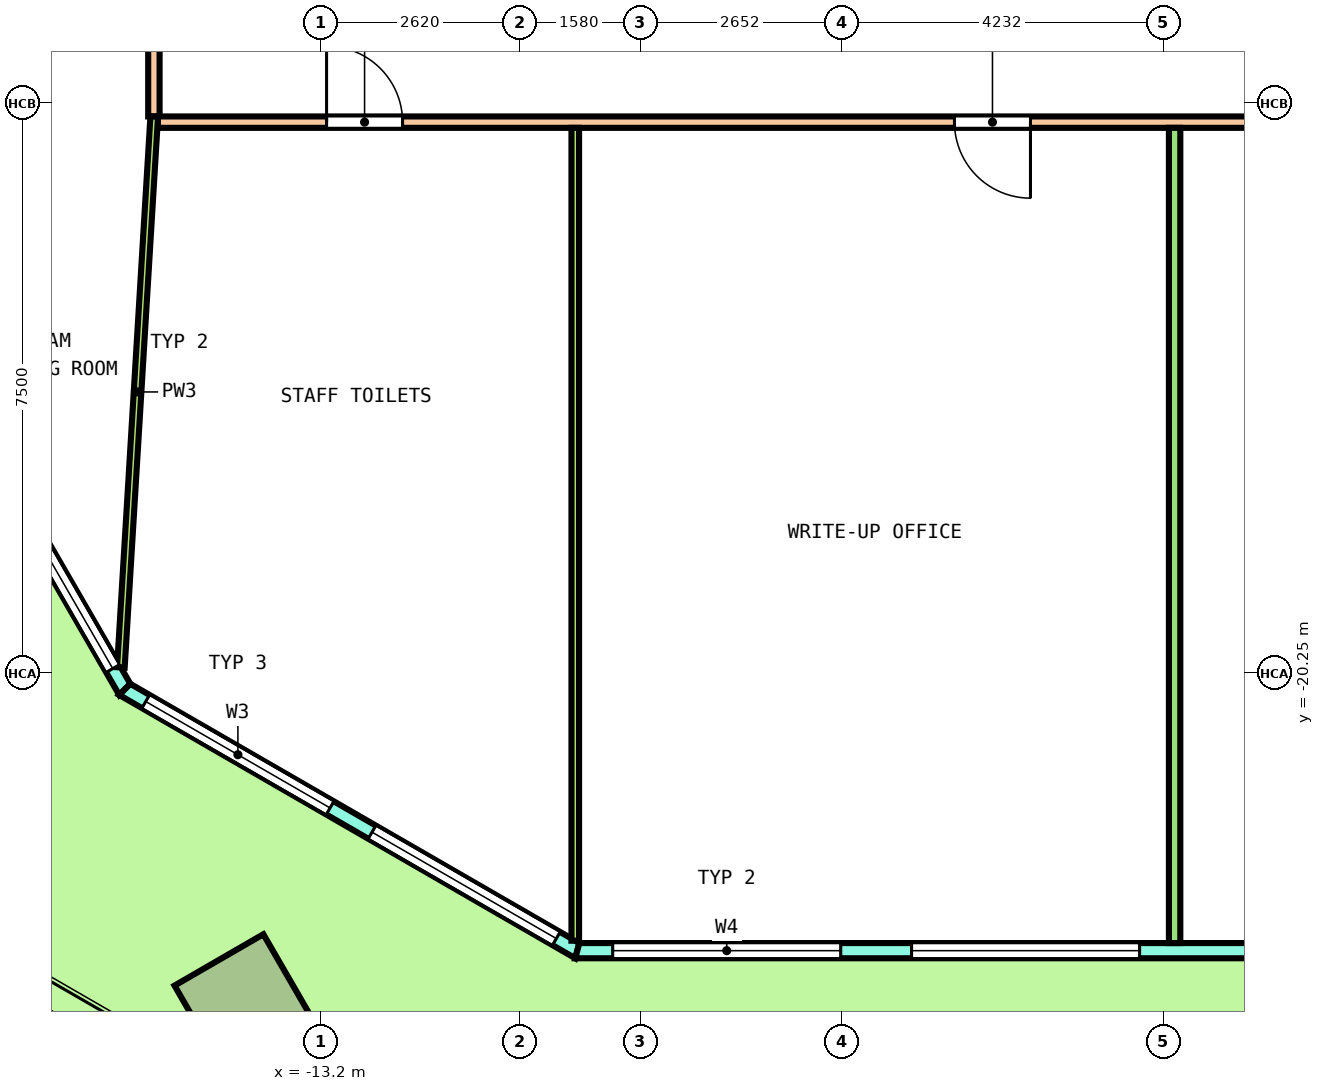
"""IFC4 building model, lengths in metres.
Left out: names, types, materials, properties, quantities, classifications, styles, units other than length and angle.
Written with IfcOpenShell. Run it as: python <this file> out.ifc"""

import sys

from ifc_helpers import new_model, si_unit, direction, frame, frame_2d, origin, origin_2d, place, context, subcontext, project, spatial, polyline, rectangle, outline, extrude, element, fill, save


model = new_model("IFC4")
c1 = context("Model", 3, precision=1e-05, world=origin(), true_north=direction((0.0, 1.0)))
c2 = subcontext(c1, "Body", "Model", "MODEL_VIEW")
j1 = project(units=[si_unit("LENGTHUNIT", "METRE"), si_unit("PLANEANGLEUNIT", "RADIAN")], contexts=[c1])
p1 = place(None, origin())
s1 = spatial("IfcSite", under=j1, at=p1, CompositionType="ELEMENT")
p2 = place(p1, origin())
s2 = spatial("IfcBuilding", under=s1, at=p2, CompositionType="ELEMENT")
p3 = place(p2, frame((0.0, 0.0, 80.8)))
s3 = spatial("IfcBuildingStorey", under=s2, at=p3, CompositionType="ELEMENT", Elevation=80.8)
p4 = place(p3, frame((-14.206, -24.606, 0.0), z_axis=(0.018132630042, -0.031385715123, 0.999342856388), x_axis=(0.866156195426, -0.498787200508, -0.031381104725)))
e1 = element("IfcColumn", 1, at=p4, inside=s3, PredefinedType="COLUMN", context=c2, shape_type="SweptSolid", body=[
    extrude(rectangle(XDim=1.35, YDim=1.35, at=origin_2d()), origin(), (0.0, 0.0, 1.0), 4.053),
])
p5 = place(p3, frame((-25.613, -3.437, 0.0), z_axis=(0.0, 0.0, 1.0), x_axis=(0.499999083763, -0.866025932773, 0.0)))
e2 = element("IfcWall", 2, at=p5, inside=s3, PredefinedType="SOLIDWALL", context=c2, shape_type="SweptSolid", body=[
    extrude(outline(polyline([(-0.027, -0.1), (1.011, -0.1), (2.048, -0.1), (3.086, -0.1), (4.123, -0.1), (5.161, -0.1), (6.198, -0.1), (7.236, -0.1), (8.273, -0.1), (9.311, -0.1), (10.348, -0.1), (11.386, -0.1), (12.423, -0.1), (13.461, -0.1), (14.499, -0.1), (15.536, -0.1), (16.573, -0.1), (17.611, -0.1), (18.648, -0.1), (19.686, -0.1), (19.632, 0.1), (18.6, 0.1), (17.569, 0.1), (16.537, 0.1), (15.505, 0.1), (14.473, 0.1), (13.441, 0.1), (12.409, 0.1), (11.377, 0.1), (10.345, 0.1), (9.314, 0.1), (8.282, 0.1), (7.25, 0.1), (6.218, 0.1), (5.186, 0.1), (4.154, 0.1), (3.123, 0.1), (2.091, 0.1), (1.059, 0.1), (0.027, 0.1), (-0.027, -0.1)])), origin(), (0.0, 0.0, 1.0), 4.1),
])
p6 = place(p5, frame((0.316, 0.0, 0.1)))
e3 = element("IfcOpeningElement", 3, at=p6, cuts=e2, PredefinedType="OPENING", context=c2, shape_type="SweptSolid", body=[
    extrude(rectangle(XDim=3.3, YDim=2.9, at=frame_2d((1.65, 1.45))), frame((0.0, 0.11, 0.0), z_axis=(0.0, -1.0, 0.0), x_axis=(1.0, 0.0, 0.0)), (0.0, 0.0, 1.0), 0.22),
])
p7 = place(p5, frame((4.248, 0.0, 0.1)))
e4 = element("IfcOpeningElement", 4, at=p7, cuts=e2, PredefinedType="OPENING", context=c2, shape_type="SweptSolid", body=[
    extrude(rectangle(XDim=3.3, YDim=2.9, at=frame_2d((1.65, 1.45))), frame((0.0, 0.11, 0.0), z_axis=(0.0, -1.0, 0.0), x_axis=(1.0, 0.0, 0.0)), (0.0, 0.0, 1.0), 0.22),
])
p8 = place(p5, frame((8.93, 0.0, 0.0)))
e5 = element("IfcOpeningElement", 5, at=p8, cuts=e2, PredefinedType="OPENING", context=c2, shape_type="SweptSolid", body=[
    extrude(rectangle(XDim=1.8, YDim=2.4, at=frame_2d((0.9, 1.2))), frame((0.0, 0.11, 0.0), z_axis=(0.0, -1.0, 0.0), x_axis=(1.0, 0.0, 0.0)), (0.0, 0.0, 1.0), 0.22),
])
p9 = place(p5, frame((8.93, 0.0, 2.55)))
e6 = element("IfcOpeningElement", 6, at=p9, cuts=e2, PredefinedType="OPENING", context=c2, shape_type="SweptSolid", body=[
    extrude(rectangle(XDim=1.8, YDim=0.45, at=frame_2d((0.9, 0.225))), frame((0.0, 0.11, 0.0), z_axis=(0.0, -1.0, 0.0), x_axis=(1.0, 0.0, 0.0)), (0.0, 0.0, 1.0), 0.22),
])
p10 = place(p5, frame((12.112, 0.0, 0.1)))
e7 = element("IfcOpeningElement", 7, at=p10, cuts=e2, PredefinedType="OPENING", context=c2, shape_type="SweptSolid", body=[
    extrude(rectangle(XDim=3.3, YDim=2.9, at=frame_2d((1.65, 1.45))), frame((0.0, 0.11, 0.0), z_axis=(0.0, -1.0, 0.0), x_axis=(1.0, 0.0, 0.0)), (0.0, 0.0, 1.0), 0.22),
])
p11 = place(p5, frame((16.043, 0.0, 0.1)))
e8 = element("IfcOpeningElement", 8, at=p11, cuts=e2, PredefinedType="OPENING", context=c2, shape_type="SweptSolid", body=[
    extrude(rectangle(XDim=3.3, YDim=2.9, at=frame_2d((1.65, 1.45))), frame((0.0, 0.11, 0.0), z_axis=(0.0, -1.0, 0.0), x_axis=(1.0, 0.0, 0.0)), (0.0, 0.0, 1.0), 0.22),
])
p12 = place(p3, frame((-15.783, -20.463, 0.0), z_axis=(0.0, 0.0, 1.0), x_axis=(0.866029458321, -0.49999297727, 0.0)))
e9 = element("IfcWall", 9, at=p12, inside=s3, PredefinedType="SOLIDWALL", context=c2, shape_type="SweptSolid", body=[
    extrude(outline(polyline([(-0.027, -0.1), (1.128, -0.1), (2.282, -0.1), (3.437, -0.1), (4.592, -0.1), (5.747, -0.1), (6.901, -0.1), (6.848, 0.1), (5.711, 0.1), (4.574, 0.1), (3.437, 0.1), (2.301, 0.1), (1.164, 0.1), (0.027, 0.1), (-0.027, -0.1)])), origin(), (0.0, 0.0, 1.0), 4.1),
])
p13 = place(p12, frame((0.319, 0.0, 0.1)))
e10 = element("IfcOpeningElement", 10, at=p13, cuts=e9, PredefinedType="OPENING", context=c2, shape_type="SweptSolid", body=[
    extrude(rectangle(XDim=2.8, YDim=2.9, at=frame_2d((1.4, 1.45))), frame((0.0, 0.11, 0.0), z_axis=(0.0, -1.0, 0.0), x_axis=(1.0, 0.0, 0.0)), (0.0, 0.0, 1.0), 0.22),
])
p14 = place(p12, frame((3.756, 0.0, 0.1)))
e11 = element("IfcOpeningElement", 11, at=p14, cuts=e9, PredefinedType="OPENING", context=c2, shape_type="SweptSolid", body=[
    extrude(rectangle(XDim=2.8, YDim=2.9, at=frame_2d((1.4, 1.45))), frame((0.0, 0.11, 0.0), z_axis=(0.0, -1.0, 0.0), x_axis=(1.0, 0.0, 0.0)), (0.0, 0.0, 1.0), 0.22),
])
p15 = place(p3, frame((-9.83, -23.9, 0.0), z_axis=(0.0, 0.0, 1.0), x_axis=(1.0, 0.0, 0.0)))
e12 = element("IfcWall", 12, at=p15, inside=s3, PredefinedType="SOLIDWALL", context=c2, shape_type="SweptSolid", body=[
    extrude(outline(polyline([(-0.027, -0.1), (1.011, -0.1), (2.048, -0.1), (3.086, -0.1), (4.123, -0.1), (5.161, -0.1), (6.198, -0.1), (7.236, -0.1), (8.273, -0.1), (9.311, -0.1), (10.348, -0.1), (11.386, -0.1), (12.423, -0.1), (13.461, -0.1), (14.499, -0.1), (15.536, -0.1), (16.573, -0.1), (17.611, -0.1), (18.648, -0.1), (19.686, -0.1), (19.632, 0.1), (18.6, 0.1), (17.569, 0.1), (16.537, 0.1), (15.505, 0.1), (14.473, 0.1), (13.441, 0.1), (12.409, 0.1), (11.377, 0.1), (10.345, 0.1), (9.314, 0.1), (8.282, 0.1), (7.25, 0.1), (6.218, 0.1), (5.186, 0.1), (4.154, 0.1), (3.123, 0.1), (2.091, 0.1), (1.059, 0.1), (0.027, 0.1), (-0.027, -0.1)])), origin(), (0.0, 0.0, 1.0), 4.1),
])
p16 = place(p15, frame((0.466, 0.0, 0.1)))
e13 = element("IfcOpeningElement", 13, at=p16, cuts=e12, PredefinedType="OPENING", context=c2, shape_type="SweptSolid", body=[
    extrude(rectangle(XDim=3.0, YDim=2.9, at=frame_2d((1.5, 1.45))), frame((0.0, 0.11, 0.0), z_axis=(0.0, -1.0, 0.0), x_axis=(1.0, 0.0, 0.0)), (0.0, 0.0, 1.0), 0.22),
])
p17 = place(p15, frame((4.398, 0.0, 0.1)))
e14 = element("IfcOpeningElement", 14, at=p17, cuts=e12, PredefinedType="OPENING", context=c2, shape_type="SweptSolid", body=[
    extrude(rectangle(XDim=3.0, YDim=2.9, at=frame_2d((1.5, 1.45))), frame((0.0, 0.11, 0.0), z_axis=(0.0, -1.0, 0.0), x_axis=(1.0, 0.0, 0.0)), (0.0, 0.0, 1.0), 0.22),
])
p18 = place(p15, frame((8.93, 0.0, 0.0)))
e15 = element("IfcOpeningElement", 15, at=p18, cuts=e12, PredefinedType="OPENING", context=c2, shape_type="SweptSolid", body=[
    extrude(rectangle(XDim=1.8, YDim=2.4, at=frame_2d((0.9, 1.2))), frame((0.0, 0.11, 0.0), z_axis=(0.0, -1.0, 0.0), x_axis=(1.0, 0.0, 0.0)), (0.0, 0.0, 1.0), 0.22),
])
p19 = place(p15, frame((8.93, 0.0, 2.55)))
e16 = element("IfcOpeningElement", 16, at=p19, cuts=e12, PredefinedType="OPENING", context=c2, shape_type="SweptSolid", body=[
    extrude(rectangle(XDim=1.8, YDim=0.45, at=frame_2d((0.9, 0.225))), frame((0.0, 0.11, 0.0), z_axis=(0.0, -1.0, 0.0), x_axis=(1.0, 0.0, 0.0)), (0.0, 0.0, 1.0), 0.22),
])
p20 = place(p15, frame((12.261, 0.0, 0.1)))
e17 = element("IfcOpeningElement", 17, at=p20, cuts=e12, PredefinedType="OPENING", context=c2, shape_type="SweptSolid", body=[
    extrude(rectangle(XDim=3.0, YDim=2.9, at=frame_2d((1.5, 1.45))), frame((0.0, 0.11, 0.0), z_axis=(0.0, -1.0, 0.0), x_axis=(1.0, 0.0, 0.0)), (0.0, 0.0, 1.0), 0.22),
])
p21 = place(p15, frame((16.193, 0.0, 0.1)))
e18 = element("IfcOpeningElement", 18, at=p21, cuts=e12, PredefinedType="OPENING", context=c2, shape_type="SweptSolid", body=[
    extrude(rectangle(XDim=3.0, YDim=2.9, at=frame_2d((1.5, 1.45))), frame((0.0, 0.11, 0.0), z_axis=(0.0, -1.0, 0.0), x_axis=(1.0, 0.0, 0.0)), (0.0, 0.0, 1.0), 0.22),
])
p22 = place(p3, frame((-15.4, -12.925, 0.0), z_axis=(0.0, 0.0, 1.0), x_axis=(0.0, 1.0, 0.0)))
e19 = element("IfcWall", 19, at=p22, inside=s3, PredefinedType="PARTITIONING", context=c2, shape_type="SweptSolid", body=[
    extrude(rectangle(XDim=25.85, YDim=0.15, at=frame_2d((12.925, 0.0))), origin(), (0.0, 0.0, 1.0), 3.05),
])
p23 = place(p22, frame((21.209, 0.0, 0.0)))
e20 = element("IfcOpeningElement", 20, at=p23, cuts=e19, PredefinedType="OPENING", context=c2, shape_type="SweptSolid", body=[
    extrude(rectangle(XDim=1.2, YDim=2.1, at=frame_2d((0.6, 1.05))), frame((0.0, 0.085, 0.0), z_axis=(0.0, -1.0, 0.0), x_axis=(1.0, 0.0, 0.0)), (0.0, 0.0, 1.0), 0.17),
])
p24 = place(p22, frame((15.289, 0.0, 0.0)))
e21 = element("IfcOpeningElement", 21, at=p24, cuts=e19, PredefinedType="OPENING", context=c2, shape_type="SweptSolid", body=[
    extrude(rectangle(XDim=1.2, YDim=2.1, at=frame_2d((0.6, 1.05))), frame((0.0, 0.085, 0.0), z_axis=(0.0, -1.0, 0.0), x_axis=(1.0, 0.0, 0.0)), (0.0, 0.0, 1.0), 0.17),
])
p25 = place(p22, frame((3.441, 0.0, 0.0)))
e22 = element("IfcOpeningElement", 22, at=p25, cuts=e19, PredefinedType="OPENING", context=c2, shape_type="SweptSolid", body=[
    extrude(rectangle(XDim=1.2, YDim=2.1, at=frame_2d((0.6, 1.05))), frame((0.0, 0.085, 0.0), z_axis=(0.0, -1.0, 0.0), x_axis=(1.0, 0.0, 0.0)), (0.0, 0.0, 1.0), 0.17),
])
p26 = place(p3, frame((-15.35, -13.0, 0.0), z_axis=(0.0, 0.0, 1.0), x_axis=(1.0, 0.0, 0.0)))
e23 = element("IfcWall", 23, at=p26, inside=s3, PredefinedType="PARTITIONING", context=c2, shape_type="SweptSolid", body=[
    extrude(rectangle(XDim=30.7, YDim=0.15, at=frame_2d((15.35, 0.0))), origin(), (0.0, 0.0, 1.0), 3.05),
])
p27 = place(p26, frame((2.222, 0.0, 0.0)))
e24 = element("IfcOpeningElement", 24, at=p27, cuts=e23, PredefinedType="OPENING", context=c2, shape_type="SweptSolid", body=[
    extrude(rectangle(XDim=1.0, YDim=2.1, at=frame_2d((0.5, 1.05))), frame((0.0, 0.085, 0.0), z_axis=(0.0, -1.0, 0.0), x_axis=(1.0, 0.0, 0.0)), (0.0, 0.0, 1.0), 0.17),
])
p28 = place(p26, frame((10.482, 0.0, 0.0)))
e25 = element("IfcOpeningElement", 25, at=p28, cuts=e23, PredefinedType="OPENING", context=c2, shape_type="SweptSolid", body=[
    extrude(rectangle(XDim=1.0, YDim=2.1, at=frame_2d((0.5, 1.05))), frame((0.0, 0.085, 0.0), z_axis=(0.0, -1.0, 0.0), x_axis=(1.0, 0.0, 0.0)), (0.0, 0.0, 1.0), 0.17),
])
p29 = place(p26, frame((15.225, 0.0, 0.0)))
e26 = element("IfcOpeningElement", 26, at=p29, cuts=e23, PredefinedType="OPENING", context=c2, shape_type="SweptSolid", body=[
    extrude(rectangle(XDim=1.2, YDim=2.1, at=frame_2d((0.6, 1.05))), frame((0.0, 0.085, 0.0), z_axis=(0.0, -1.0, 0.0), x_axis=(1.0, 0.0, 0.0)), (0.0, 0.0, 1.0), 0.17),
])
p30 = place(p26, frame((22.875, 0.0, 0.0)))
e27 = element("IfcOpeningElement", 27, at=p30, cuts=e23, PredefinedType="OPENING", context=c2, shape_type="SweptSolid", body=[
    extrude(rectangle(XDim=1.2, YDim=2.1, at=frame_2d((0.6, 1.05))), frame((0.0, 0.085, 0.0), z_axis=(0.0, -1.0, 0.0), x_axis=(1.0, 0.0, 0.0)), (0.0, 0.0, 1.0), 0.17),
])
p31 = place(p26, frame((28.852, 0.0, 0.0)))
e28 = element("IfcOpeningElement", 28, at=p31, cuts=e23, PredefinedType="OPENING", context=c2, shape_type="SweptSolid", body=[
    extrude(rectangle(XDim=1.0, YDim=2.1, at=frame_2d((0.5, 1.05))), frame((0.0, 0.085, 0.0), z_axis=(0.0, -1.0, 0.0), x_axis=(1.0, 0.0, 0.0)), (0.0, 0.0, 1.0), 0.17),
])
p32 = place(p3, frame((-1.971, -23.8, 0.0), z_axis=(0.0, 0.0, 1.0), x_axis=(0.0, 1.0, 0.0)))
e29 = element("IfcWall", 29, at=p32, inside=s3, PredefinedType="PARTITIONING", context=c2, shape_type="SweptSolid", body=[
    extrude(rectangle(XDim=10.725, YDim=0.15, at=frame_2d((5.363, 0.0))), origin(), (0.0, 0.0, 1.0), 3.05),
])
p33 = place(p3, frame((-15.834, -20.174, 0.0), z_axis=(0.0, 0.0, 1.0), x_axis=(0.060446339426, 0.998171448224, 0.0)))
e30 = element("IfcWall", 30, at=p33, inside=s3, PredefinedType="PARTITIONING", context=c2, shape_type="SweptSolid", body=[
    extrude(rectangle(XDim=7.262, YDim=0.1, at=frame_2d((3.631, 0.0))), origin(), (0.0, 0.0, 1.0), 3.05),
])
p34 = place(p3, frame((-9.856, -23.769, 0.0), z_axis=(0.0, 0.0, 1.0), x_axis=(0.0, 1.0, 0.0)))
e31 = element("IfcWall", 31, at=p34, inside=s3, PredefinedType="PARTITIONING", context=c2, shape_type="SweptSolid", body=[
    extrude(rectangle(XDim=10.694, YDim=0.1, at=frame_2d((5.347, 0.0))), origin(), (0.0, 0.0, 1.0), 3.05),
])
p35 = place(p11, origin())
e32 = element("IfcWindow", 32, at=p35, inside=s3, PartitioningType="SINGLE_PANEL", PredefinedType="WINDOW", context=c2, shape_type="SweptSolid", body=[
    extrude(rectangle(XDim=3.3, YDim=2.9, at=frame_2d((1.65, 1.45))), frame((0.0, 0.03, 0.0), z_axis=(0.0, -1.0, 0.0), x_axis=(1.0, 0.0, 0.0)), (0.0, 0.0, 1.0), 0.06),
])
fill(e8, e32)
p36 = place(p13, origin())
e33 = element("IfcWindow", 33, at=p36, inside=s3, PartitioningType="SINGLE_PANEL", PredefinedType="WINDOW", context=c2, shape_type="SweptSolid", body=[
    extrude(rectangle(XDim=2.8, YDim=2.9, at=frame_2d((1.4, 1.45))), frame((0.0, 0.03, 0.0), z_axis=(0.0, -1.0, 0.0), x_axis=(1.0, 0.0, 0.0)), (0.0, 0.0, 1.0), 0.06),
])
fill(e10, e33)
p37 = place(p14, origin())
e34 = element("IfcWindow", 34, at=p37, inside=s3, PartitioningType="SINGLE_PANEL", PredefinedType="WINDOW", context=c2, shape_type="SweptSolid", body=[
    extrude(rectangle(XDim=2.8, YDim=2.9, at=frame_2d((1.4, 1.45))), frame((0.0, 0.03, 0.0), z_axis=(0.0, -1.0, 0.0), x_axis=(1.0, 0.0, 0.0)), (0.0, 0.0, 1.0), 0.06),
])
fill(e11, e34)
p38 = place(p16, origin())
e35 = element("IfcWindow", 35, at=p38, inside=s3, PartitioningType="SINGLE_PANEL", PredefinedType="WINDOW", context=c2, shape_type="SweptSolid", body=[
    extrude(rectangle(XDim=3.0, YDim=2.9, at=frame_2d((1.5, 1.45))), frame((0.0, 0.03, 0.0), z_axis=(0.0, -1.0, 0.0), x_axis=(1.0, 0.0, 0.0)), (0.0, 0.0, 1.0), 0.06),
])
fill(e13, e35)
p39 = place(p17, origin())
e36 = element("IfcWindow", 36, at=p39, inside=s3, PartitioningType="SINGLE_PANEL", PredefinedType="WINDOW", context=c2, shape_type="SweptSolid", body=[
    extrude(rectangle(XDim=3.0, YDim=2.9, at=frame_2d((1.5, 1.45))), frame((0.0, 0.03, 0.0), z_axis=(0.0, -1.0, 0.0), x_axis=(1.0, 0.0, 0.0)), (0.0, 0.0, 1.0), 0.06),
])
fill(e14, e36)
p40 = place(p27, origin())
e37 = element("IfcDoor", 37, at=p40, inside=s3, OperationType="SINGLE_SWING_LEFT", PredefinedType="DOOR", context=c2, shape_type="SweptSolid", body=[
    extrude(rectangle(XDim=1.0, YDim=2.1, at=frame_2d((0.5, 1.05))), frame((0.0, 0.025, 0.0), z_axis=(0.0, -1.0, 0.0), x_axis=(1.0, 0.0, 0.0)), (0.0, 0.0, 1.0), 0.05),
])
fill(e24, e37)
p41 = place(p28, origin())
e38 = element("IfcDoor", 38, at=p41, inside=s3, OperationType="SINGLE_SWING_LEFT", PredefinedType="DOOR", context=c2, shape_type="SweptSolid", body=[
    extrude(rectangle(XDim=1.0, YDim=2.1, at=frame_2d((0.5, 1.05))), frame((0.0, 0.025, 0.0), z_axis=(0.0, -1.0, 0.0), x_axis=(1.0, 0.0, 0.0)), (0.0, 0.0, 1.0), 0.05),
])
fill(e25, e38)
save(model, sys.argv[1])
